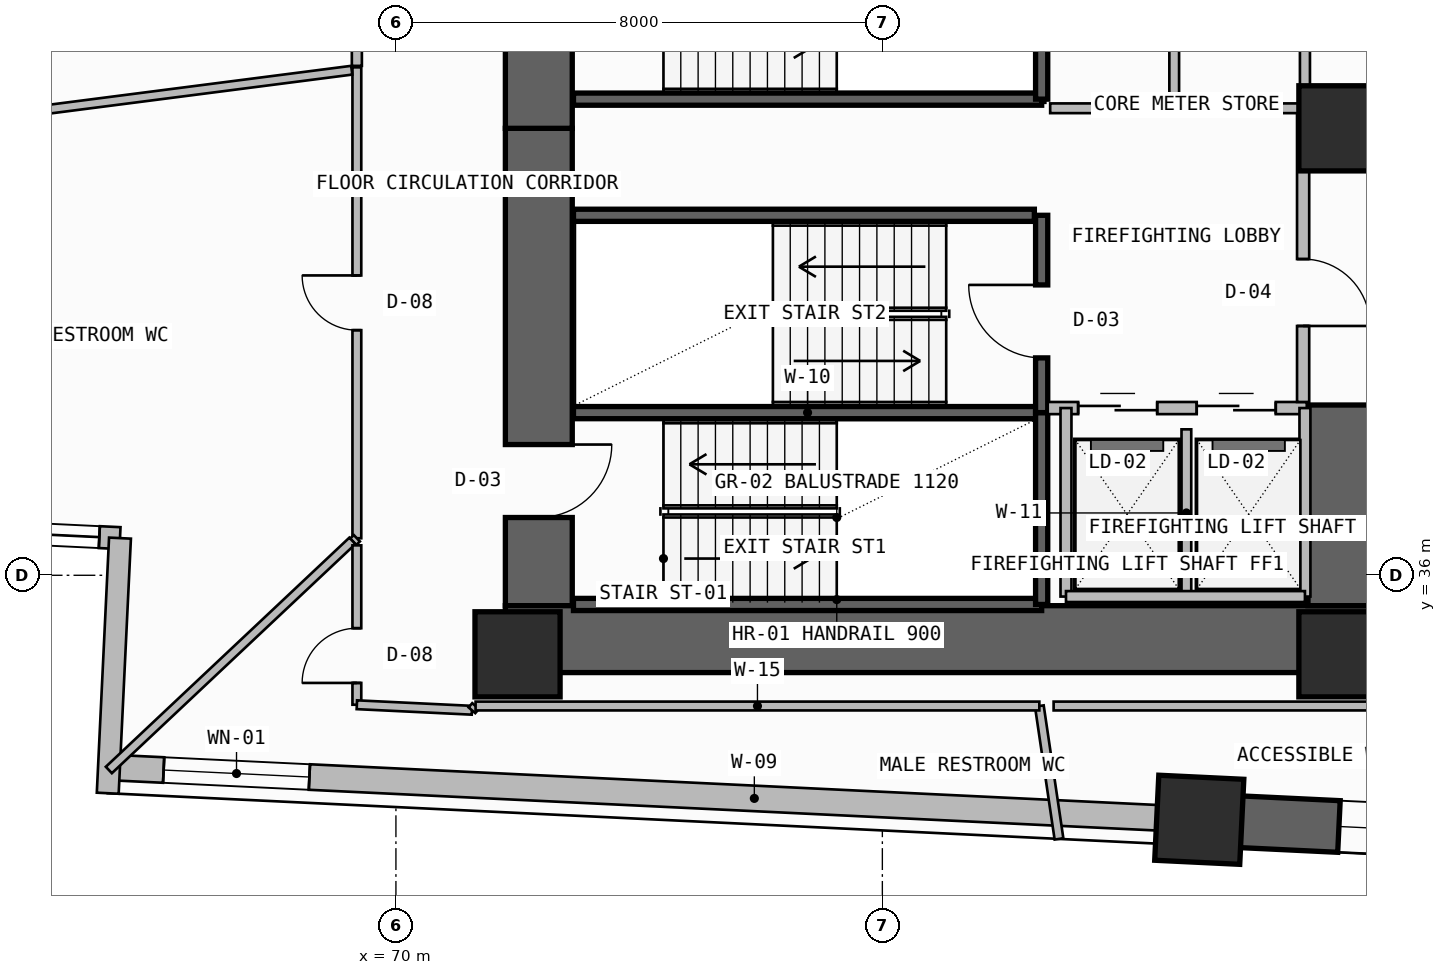
"""IFC4 building model, lengths in metres.
Left out: names, types, materials, properties, quantities, classifications, styles, units other than length and angle.
Written with IfcOpenShell. Run it as: python <this file> out.ifc"""

import sys

from ifc_helpers import new_model, si_unit, direction, frame, frame_2d, origin, origin_2d, place, context, subcontext, project, spatial, rectangle, extrude, element, fill, save


model = new_model("IFC4")
c1 = context("Model", 3, precision=1e-05, world=origin(), true_north=direction((0.0, 1.0)))
c2 = subcontext(c1, "Body", "Model", "MODEL_VIEW")
j1 = project(units=[si_unit("LENGTHUNIT", "METRE"), si_unit("PLANEANGLEUNIT", "RADIAN")], contexts=[c1])
p1 = place(None, origin())
s1 = spatial("IfcSite", under=j1, at=p1, CompositionType="ELEMENT")
p2 = place(p1, origin())
s2 = spatial("IfcBuilding", under=s1, at=p2, CompositionType="ELEMENT")
p3 = place(p2, frame((0.0, 0.0, 33.9)))
s3 = spatial("IfcBuildingStorey", under=s2, at=p3, CompositionType="ELEMENT", Elevation=33.9)
p4 = place(p3, frame((72.35, 35.5, -0.2), z_axis=(0.0, 0.0, 1.0), x_axis=(0.0, 1.0, 0.0)))
e1 = element("IfcWall", 1, at=p4, inside=s3, PredefinedType="SHEAR", context=c2, shape_type="SweptSolid", body=[
    extrude(rectangle(XDim=7.85, YDim=1.1, at=frame_2d((3.925, 0.0))), origin(), (0.0, 0.0, 1.0), 3.54),
])
p5 = place(p4, frame((1.45, 0.0, 0.2)))
e2 = element("IfcOpeningElement", 2, at=p5, cuts=e1, PredefinedType="OPENING", context=c2, shape_type="SweptSolid", body=[
    extrude(rectangle(XDim=1.2, YDim=2.2, at=frame_2d((0.6, 1.1))), frame((0.0, 0.56, 0.0), z_axis=(0.0, -1.0, 0.0), x_axis=(1.0, 0.0, 0.0)), (0.0, 0.0, 1.0), 1.12),
])
p6 = place(p3, frame((71.8, 34.95, -0.2), z_axis=(0.0, 0.0, 1.0), x_axis=(1.0, 0.0, 0.0)))
e3 = element("IfcWall", 3, at=p6, inside=s3, PredefinedType="SHEAR", context=c2, shape_type="SweptSolid", body=[
    extrude(rectangle(XDim=14.3, YDim=1.1, at=frame_2d((7.15, 0.0))), origin(), (0.0, 0.0, 1.0), 3.54),
])
p7 = place(p3, frame((85.55, 35.5, -0.2), z_axis=(0.0, 0.0, 1.0), x_axis=(0.0, 1.0, 0.0)))
e4 = element("IfcWall", 4, at=p7, inside=s3, PredefinedType="SHEAR", context=c2, shape_type="SweptSolid", body=[
    extrude(rectangle(XDim=3.3, YDim=1.1, at=frame_2d((1.65, 0.0))), origin(), (0.0, 0.0, 1.0), 3.54),
])
p8 = place(p3, frame((72.35, 43.35, -0.2), z_axis=(0.0, 0.0, 1.0), x_axis=(0.0, 1.0, 0.0)))
e5 = element("IfcWall", 5, at=p8, inside=s3, PredefinedType="SHEAR", context=c2, shape_type="SweptSolid", body=[
    extrude(rectangle(XDim=12.7, YDim=1.1, at=frame_2d((6.35, 0.0))), origin(), (0.0, 0.0, 1.0), 3.54),
])
p9 = place(p8, frame((1.35, 0.0, 0.2)))
e6 = element("IfcOpeningElement", 6, at=p9, cuts=e5, PredefinedType="OPENING", context=c2, shape_type="SweptSolid", body=[
    extrude(rectangle(XDim=1.2, YDim=2.2, at=frame_2d((0.6, 1.1))), frame((0.0, 0.56, 0.0), z_axis=(0.0, -1.0, 0.0), x_axis=(1.0, 0.0, 0.0)), (0.0, 0.0, 1.0), 1.12),
])
for number, where, z_axis, x_axis in (
    (7, (72.0, 34.7, 0.0), (0.0, 0.0, 1.0), (1.0, 0.0, 0.0)),
    (8, (85.55, 34.7, 0.0), (0.0, 0.0, 1.0), (1.0, 0.0, 0.0)),
    (9, (85.55, 43.35, 0.0), (0.0, 0.0, 1.0), (1.0, 0.0, 0.0)),
    (10, (83.212, 31.979, 0.0), (0.0, 0.0, 1.0), (-0.999, 0.048, 0.0)),
):
    element("IfcColumn", number, at=place(p3, frame(where, z_axis=z_axis, x_axis=x_axis)), inside=s3, PredefinedType="COLUMN", context=c2, shape_type="SweptSolid", body=[
        extrude(rectangle(XDim=1.4, YDim=1.4, at=origin_2d()), origin(), (0.0, 0.0, 1.0), 3.6),
    ])
p10 = place(p3, frame((65.281, 32.841, 0.0), z_axis=(0.0, 0.0, 1.0), x_axis=(0.998848298084, -0.047979968897, 0.0)))
e11 = element("IfcWall", 11, at=p10, inside=s3, PredefinedType="SOLIDWALL", context=c2, shape_type="SweptSolid", body=[
    extrude(rectangle(XDim=17.952, YDim=0.42, at=frame_2d((8.976, 0.0))), origin(), (0.0, 0.0, 1.0), 2.325),
])
p11 = place(p10, frame((0.9, 0.0, 1.2)))
e12 = element("IfcOpeningElement", 12, at=p11, cuts=e11, PredefinedType="OPENING", context=c2, shape_type="SweptSolid", body=[
    extrude(rectangle(XDim=2.4, YDim=0.9, at=frame_2d((1.2, 0.45))), frame((0.0, 0.22, 0.0), z_axis=(0.0, -1.0, 0.0), x_axis=(1.0, 0.0, 0.0)), (0.0, 0.0, 1.0), 0.44),
])
p12 = place(p3, frame((83.212, 31.979, -0.2), z_axis=(0.0, 0.0, 1.0), x_axis=(0.998848235141, -0.047981279227, 0.0)))
e13 = element("IfcWall", 13, at=p12, inside=s3, PredefinedType="SHEAR", context=c2, shape_type="SweptSolid", body=[
    extrude(rectangle(XDim=27.456, YDim=0.85, at=frame_2d((13.728, 0.0))), origin(), (0.0, 0.0, 1.0), 3.54),
])
p13 = place(p12, frame((2.3, 0.0, 1.2)))
e14 = element("IfcOpeningElement", 14, at=p13, cuts=e13, PredefinedType="OPENING", context=c2, shape_type="SweptSolid", body=[
    extrude(rectangle(XDim=2.4, YDim=0.9, at=frame_2d((1.2, 0.45))), frame((0.0, 0.435, 0.0), z_axis=(0.0, -1.0, 0.0), x_axis=(1.0, 0.0, 0.0)), (0.0, 0.0, 1.0), 0.87),
])
p14 = place(p3, frame((61.267, 36.812, 0.0), z_axis=(0.0, 0.0, 1.0), x_axis=(0.998849519138, -0.047954542207, 0.0)))
e15 = element("IfcWall", 15, at=p14, inside=s3, PredefinedType="SOLIDWALL", context=c2, shape_type="SweptSolid", body=[
    extrude(rectangle(XDim=4.2, YDim=0.36, at=frame_2d((2.1, 0.0))), origin(), (0.0, 0.0, 1.0), 3.34),
])
p15 = place(p14, frame((2.56, 0.0, 0.45)))
e16 = element("IfcOpeningElement", 16, at=p15, cuts=e15, PredefinedType="OPENING", context=c2, shape_type="SweptSolid", body=[
    extrude(rectangle(XDim=1.3, YDim=2.4, at=frame_2d((0.65, 1.2))), frame((0.0, 0.19, 0.0), z_axis=(0.0, -1.0, 0.0), x_axis=(1.0, 0.0, 0.0)), (0.0, 0.0, 1.0), 0.38),
])
p16 = place(p3, frame((65.462, 36.611, 0.0), z_axis=(0.0, 0.0, 1.0), x_axis=(-0.048015322758, -0.998846599224, 0.0)))
e17 = element("IfcWall", 17, at=p16, inside=s3, PredefinedType="SOLIDWALL", context=c2, shape_type="SweptSolid", body=[
    extrude(rectangle(XDim=4.2, YDim=0.36, at=frame_2d((2.1, 0.0))), origin(), (0.0, 0.0, 1.0), 3.34),
])
for number, where, z_axis, x_axis in (
    (18, (72.92, 35.52, -0.2), (0.0, 0.0, 1.0), (1.0, 0.0, 0.0)),
    (19, (72.92, 38.675, -0.2), (0.0, 0.0, 1.0), (1.0, 0.0, 0.0)),
):
    element("IfcWall", number, at=place(p3, frame(where, z_axis=z_axis, x_axis=x_axis)), inside=s3, PredefinedType="SOLIDWALL", context=c2, shape_type="SweptSolid", body=[
        extrude(rectangle(XDim=7.7, YDim=0.2, at=frame_2d((3.85, 0.0))), origin(), (0.0, 0.0, 1.0), 3.54),
    ])
p17 = place(p3, frame((80.62, 35.52, -0.2), z_axis=(0.0, 0.0, 1.0), x_axis=(0.0, 1.0, 0.0)))
e20 = element("IfcWall", 20, at=p17, inside=s3, PredefinedType="SOLIDWALL", context=c2, shape_type="SweptSolid", body=[
    extrude(rectangle(XDim=3.155, YDim=0.2, at=frame_2d((1.578, 0.0))), origin(), (0.0, 0.0, 1.0), 3.54),
])
p18 = place(p3, frame((80.62, 38.675, -0.2), z_axis=(0.0, 0.0, 1.0), x_axis=(0.0, 1.0, 0.0)))
e21 = element("IfcWall", 21, at=p18, inside=s3, PredefinedType="SOLIDWALL", context=c2, shape_type="SweptSolid", body=[
    extrude(rectangle(XDim=3.245, YDim=0.2, at=frame_2d((1.623, 0.0))), origin(), (0.0, 0.0, 1.0), 3.54),
])
p19 = place(p18, frame((0.9, 0.0, 0.2)))
e22 = element("IfcOpeningElement", 22, at=p19, cuts=e21, PredefinedType="OPENING", context=c2, shape_type="SweptSolid", body=[
    extrude(rectangle(XDim=1.2, YDim=2.2, at=frame_2d((0.6, 1.1))), frame((0.0, 0.11, 0.0), z_axis=(0.0, -1.0, 0.0), x_axis=(1.0, 0.0, 0.0)), (0.0, 0.0, 1.0), 0.22),
])
p20 = place(p3, frame((80.72, 38.75, 0.0), z_axis=(0.0, 0.0, 1.0), x_axis=(1.0, 0.0, 0.0)))
e23 = element("IfcWall", 23, at=p20, inside=s3, PredefinedType="SOLIDWALL", context=c2, shape_type="SweptSolid", body=[
    extrude(rectangle(XDim=4.26, YDim=0.2, at=frame_2d((2.13, 0.0))), origin(), (0.0, 0.0, 1.0), 3.34),
])
p21 = place(p20, frame((0.5, 0.0, 0.0)))
e24 = element("IfcOpeningElement", 24, at=p21, cuts=e23, PredefinedType="OPENING", context=c2, shape_type="SweptSolid", body=[
    extrude(rectangle(XDim=1.3, YDim=2.3, at=frame_2d((0.65, 1.15))), frame((0.0, 0.11, 0.0), z_axis=(0.0, -1.0, 0.0), x_axis=(1.0, 0.0, 0.0)), (0.0, 0.0, 1.0), 0.22),
])
p22 = place(p20, frame((2.45, 0.0, 0.0)))
e25 = element("IfcOpeningElement", 25, at=p22, cuts=e23, PredefinedType="OPENING", context=c2, shape_type="SweptSolid", body=[
    extrude(rectangle(XDim=1.3, YDim=2.3, at=frame_2d((0.65, 1.15))), frame((0.0, 0.11, 0.0), z_axis=(0.0, -1.0, 0.0), x_axis=(1.0, 0.0, 0.0)), (0.0, 0.0, 1.0), 0.22),
])
p23 = place(p3, frame((83.0, 35.65, 0.0), z_axis=(0.0, 0.0, 1.0), x_axis=(0.0, 1.0, 0.0)))
e26 = element("IfcWall", 26, at=p23, inside=s3, PredefinedType="PLUMBINGWALL", context=c2, shape_type="SweptSolid", body=[
    extrude(rectangle(XDim=2.75, YDim=0.16, at=frame_2d((1.375, 0.0))), origin(), (0.0, 0.0, 1.0), 3.34),
])
for number, where, z_axis, x_axis in (
    (27, (84.95, 35.65, 0.0), (0.0, 0.0, 1.0), (0.0, 1.0, 0.0)),
    (28, (81.02, 35.65, 0.0), (0.0, 0.0, 1.0), (0.0, 1.0, 0.0)),
):
    element("IfcWall", number, at=place(p3, frame(where, z_axis=z_axis, x_axis=x_axis)), inside=s3, PredefinedType="SOLIDWALL", context=c2, shape_type="SweptSolid", body=[
        extrude(rectangle(XDim=3.1, YDim=0.18, at=frame_2d((1.55, 0.0))), origin(), (0.0, 0.0, 1.0), 3.34),
    ])
p24 = place(p3, frame((81.02, 35.65, 0.0), z_axis=(0.0, 0.0, 1.0), x_axis=(1.0, 0.0, 0.0)))
e29 = element("IfcWall", 29, at=p24, inside=s3, PredefinedType="SOLIDWALL", context=c2, shape_type="SweptSolid", body=[
    extrude(rectangle(XDim=3.93, YDim=0.18, at=frame_2d((1.965, 0.0))), origin(), (0.0, 0.0, 1.0), 3.34),
])
p25 = place(p3, frame((84.92, 38.85, 0.0), z_axis=(0.0, 0.0, 1.0), x_axis=(0.0, 1.0, 0.0)))
e30 = element("IfcWall", 30, at=p25, inside=s3, PredefinedType="SOLIDWALL", context=c2, shape_type="SweptSolid", body=[
    extrude(rectangle(XDim=4.83, YDim=0.2, at=frame_2d((2.415, 0.0))), origin(), (0.0, 0.0, 1.0), 3.34),
])
p26 = place(p25, frame((1.25, 0.0, 0.0)))
e31 = element("IfcOpeningElement", 31, at=p26, cuts=e30, PredefinedType="OPENING", context=c2, shape_type="SweptSolid", body=[
    extrude(rectangle(XDim=1.1, YDim=2.2, at=frame_2d((0.55, 1.1))), frame((0.0, 0.11, 0.0), z_axis=(0.0, -1.0, 0.0), x_axis=(1.0, 0.0, 0.0)), (0.0, 0.0, 1.0), 0.22),
])
p27 = place(p3, frame((72.92, 41.92, -0.2), z_axis=(0.0, 0.0, 1.0), x_axis=(1.0, 0.0, 0.0)))
e32 = element("IfcWall", 32, at=p27, inside=s3, PredefinedType="SOLIDWALL", context=c2, shape_type="SweptSolid", body=[
    extrude(rectangle(XDim=7.58, YDim=0.2, at=frame_2d((3.79, 0.0))), origin(), (0.0, 0.0, 1.0), 3.54),
])
p28 = place(p3, frame((72.92, 43.83, -0.2), z_axis=(0.0, 0.0, 1.0), x_axis=(1.0, 0.0, 0.0)))
e33 = element("IfcWall", 33, at=p28, inside=s3, PredefinedType="SOLIDWALL", context=c2, shape_type="SweptSolid", body=[
    extrude(rectangle(XDim=7.7, YDim=0.2, at=frame_2d((3.85, 0.0))), origin(), (0.0, 0.0, 1.0), 3.54),
])
p29 = place(p3, frame((80.62, 43.83, -0.2), z_axis=(0.0, 0.0, 1.0), x_axis=(0.0, 1.0, 0.0)))
e34 = element("IfcWall", 34, at=p29, inside=s3, PredefinedType="SOLIDWALL", context=c2, shape_type="SweptSolid", body=[
    extrude(rectangle(XDim=3.24, YDim=0.2, at=frame_2d((1.62, 0.0))), origin(), (0.0, 0.0, 1.0), 3.54),
])
p30 = place(p3, frame((84.95, 43.68, 0.0), z_axis=(0.0, 0.0, 1.0), x_axis=(0.0, 1.0, 0.0)))
e35 = element("IfcWall", 35, at=p30, inside=s3, PredefinedType="PLUMBINGWALL", context=c2, shape_type="SweptSolid", body=[
    extrude(rectangle(XDim=1.9, YDim=0.165, at=frame_2d((0.95, 0.0))), origin(), (0.0, 0.0, 1.0), 3.34),
])
p31 = place(p3, frame((80.76, 43.68, 0.0), z_axis=(0.0, 0.0, 1.0), x_axis=(1.0, 0.0, 0.0)))
e36 = element("IfcWall", 36, at=p31, inside=s3, PredefinedType="PLUMBINGWALL", context=c2, shape_type="SweptSolid", body=[
    extrude(rectangle(XDim=4.19, YDim=0.16, at=frame_2d((2.095, 0.0))), origin(), (0.0, 0.0, 1.0), 3.34),
])
p32 = place(p3, frame((82.8, 43.68, 0.0), z_axis=(0.0, 0.0, 1.0), x_axis=(0.0, 1.0, 0.0)))
e37 = element("IfcWall", 37, at=p32, inside=s3, PredefinedType="PLUMBINGWALL", context=c2, shape_type="SweptSolid", body=[
    extrude(rectangle(XDim=1.9, YDim=0.16, at=frame_2d((0.95, 0.0))), origin(), (0.0, 0.0, 1.0), 3.34),
])
p33 = place(p3, frame((69.357, 44.353, 0.0), z_axis=(0.0, 0.0, 1.0), x_axis=(0.0, -1.0, 0.0)))
e38 = element("IfcWall", 38, at=p33, inside=s3, PredefinedType="PARTITIONING", context=c2, shape_type="SweptSolid", body=[
    extrude(rectangle(XDim=7.744, YDim=0.145, at=frame_2d((3.872, 0.0))), origin(), (0.0, 0.0, 1.0), 3.34),
])
p34 = place(p33, frame((3.422, 0.0, 0.0)))
e39 = element("IfcOpeningElement", 39, at=p34, cuts=e38, PredefinedType="OPENING", context=c2, shape_type="SweptSolid", body=[
    extrude(rectangle(XDim=0.9, YDim=2.1, at=frame_2d((0.45, 1.05))), frame((0.0, 0.083, 0.0), z_axis=(0.0, -1.0, 0.0), x_axis=(1.0, 0.0, 0.0)), (0.0, 0.0, 1.0), 0.165),
])
p35 = place(p3, frame((69.357, 36.609, 0.0), z_axis=(0.0, 0.0, 1.0), x_axis=(-0.723154482123, -0.690686321701, 0.0)))
e40 = element("IfcWall", 40, at=p35, inside=s3, PredefinedType="PARTITIONING", context=c2, shape_type="SweptSolid", body=[
    extrude(rectangle(XDim=0.083, YDim=0.145, at=frame_2d((0.042, 0.0))), origin(), (0.0, 0.0, 1.0), 3.34),
])
p36 = place(p3, frame((69.284, 36.566, 0.0), z_axis=(0.0, 0.0, 1.0), x_axis=(-0.728310768674, -0.685246980463, 0.0)))
e41 = element("IfcWall", 41, at=p36, inside=s3, PredefinedType="PARTITIONING", context=c2, shape_type="SweptSolid", body=[
    extrude(rectangle(XDim=5.499, YDim=0.145, at=frame_2d((2.75, 0.0))), origin(), (0.0, 0.0, 1.0), 3.34),
])
p37 = place(p3, frame((61.579, 43.315, 0.0), z_axis=(0.0, 0.0, 1.0), x_axis=(0.991807089994, 0.127744652481, 0.0)))
e42 = element("IfcWall", 42, at=p37, inside=s3, PredefinedType="PARTITIONING", context=c2, shape_type="SweptSolid", body=[
    extrude(rectangle(XDim=7.757, YDim=0.145, at=frame_2d((3.879, 0.0))), origin(), (0.0, 0.0, 1.0), 3.34),
])
p38 = place(p3, frame((69.357, 36.492, 0.0), z_axis=(0.0, 0.0, 1.0), x_axis=(0.0, -1.0, 0.0)))
e43 = element("IfcWall", 43, at=p38, inside=s3, PredefinedType="PARTITIONING", context=c2, shape_type="SweptSolid", body=[
    extrude(rectangle(XDim=2.621, YDim=0.145, at=frame_2d((1.311, 0.0))), origin(), (0.0, 0.0, 1.0), 3.34),
])
p39 = place(p38, frame((1.363, 0.0, 0.0)))
e44 = element("IfcOpeningElement", 44, at=p39, cuts=e43, PredefinedType="OPENING", context=c2, shape_type="SweptSolid", body=[
    extrude(rectangle(XDim=0.9, YDim=2.1, at=frame_2d((0.45, 1.05))), frame((0.0, 0.083, 0.0), z_axis=(0.0, -1.0, 0.0), x_axis=(1.0, 0.0, 0.0)), (0.0, 0.0, 1.0), 0.165),
])
p40 = place(p3, frame((69.357, 33.871, 0.0), z_axis=(0.0, 0.0, 1.0), x_axis=(0.998850579145, -0.047932458132, 0.0)))
e45 = element("IfcWall", 45, at=p40, inside=s3, PredefinedType="PARTITIONING", context=c2, shape_type="SweptSolid", body=[
    extrude(rectangle(XDim=1.895, YDim=0.145, at=frame_2d((0.947, 0.0))), origin(), (0.0, 0.0, 1.0), 3.34),
])
p41 = place(p3, frame((71.25, 33.78, 0.0), z_axis=(0.0, 0.0, 1.0), x_axis=(0.652100218984, 0.758132774916, 0.0)))
e46 = element("IfcWall", 46, at=p41, inside=s3, PredefinedType="PARTITIONING", context=c2, shape_type="SweptSolid", body=[
    extrude(rectangle(XDim=0.092, YDim=0.145, at=frame_2d((0.046, 0.0))), origin(), (0.0, 0.0, 1.0), 3.34),
])
p42 = place(p3, frame((80.582, 33.85, 0.0), z_axis=(0.0, 0.0, 1.0), x_axis=(0.146308364434, -0.989239032033, 0.0)))
e47 = element("IfcWall", 47, at=p42, inside=s3, PredefinedType="PARTITIONING", context=c2, shape_type="SweptSolid", body=[
    extrude(rectangle(XDim=2.209, YDim=0.145, at=frame_2d((1.104, 0.0))), origin(), (0.0, 0.0, 1.0), 3.34),
])
p43 = place(p3, frame((69.357, 50.767, 0.0), z_axis=(0.0, 0.0, 1.0), x_axis=(0.0, -1.0, 0.0)))
e48 = element("IfcWall", 48, at=p43, inside=s3, PredefinedType="PARTITIONING", context=c2, shape_type="SweptSolid", body=[
    extrude(rectangle(XDim=6.389, YDim=0.165, at=frame_2d((3.195, 0.0))), origin(), (0.0, 0.0, 1.0), 3.34),
])
p44 = place(p43, frame((2.695, 0.0, 0.0)))
e49 = element("IfcOpeningElement", 49, at=p44, cuts=e48, PredefinedType="OPENING", context=c2, shape_type="SweptSolid", body=[
    extrude(rectangle(XDim=1.0, YDim=2.2, at=frame_2d((0.5, 1.1))), frame((0.0, 0.093, 0.0), z_axis=(0.0, -1.0, 0.0), x_axis=(1.0, 0.0, 0.0)), (0.0, 0.0, 1.0), 0.185),
])
p45 = place(p3, frame((71.31, 33.85, 0.0), z_axis=(0.0, 0.0, 1.0), x_axis=(1.0, 0.0, 0.0)))
e50 = element("IfcWall", 50, at=p45, inside=s3, PredefinedType="PARTITIONING", context=c2, shape_type="SweptSolid", body=[
    extrude(rectangle(XDim=9.272, YDim=0.145, at=frame_2d((4.636, 0.0))), origin(), (0.0, 0.0, 1.0), 3.34),
])
p46 = place(p3, frame((80.817, 33.85, 0.0), z_axis=(0.0, 0.0, 1.0), x_axis=(1.0, 0.0, 0.0)))
e51 = element("IfcWall", 51, at=p46, inside=s3, PredefinedType="PARTITIONING", context=c2, shape_type="SweptSolid", body=[
    extrude(rectangle(XDim=5.251, YDim=0.145, at=frame_2d((2.625, 0.0))), origin(), (0.0, 0.0, 1.0), 2.725),
])
p47 = place(p11, origin())
e52 = element("IfcWindow", 52, at=p47, inside=s3, PartitioningType="SINGLE_PANEL", PredefinedType="WINDOW", context=c2, shape_type="SweptSolid", body=[
    extrude(rectangle(XDim=2.4, YDim=0.9, at=frame_2d((1.2, 0.45))), frame((0.0, 0.03, 0.0), z_axis=(0.0, -1.0, 0.0), x_axis=(1.0, 0.0, 0.0)), (0.0, 0.0, 1.0), 0.06),
])
fill(e12, e52)
p48 = place(p13, origin())
e53 = element("IfcWindow", 53, at=p48, inside=s3, PartitioningType="SINGLE_PANEL", PredefinedType="WINDOW", context=c2, shape_type="SweptSolid", body=[
    extrude(rectangle(XDim=2.4, YDim=0.9, at=frame_2d((1.2, 0.45))), frame((0.0, 0.03, 0.0), z_axis=(0.0, -1.0, 0.0), x_axis=(1.0, 0.0, 0.0)), (0.0, 0.0, 1.0), 0.06),
])
fill(e14, e53)
p49 = place(p15, origin())
e54 = element("IfcWindow", 54, at=p49, inside=s3, PartitioningType="SINGLE_PANEL", PredefinedType="WINDOW", context=c2, shape_type="SweptSolid", body=[
    extrude(rectangle(XDim=1.3, YDim=2.4, at=frame_2d((0.65, 1.2))), frame((0.0, 0.03, 0.0), z_axis=(0.0, -1.0, 0.0), x_axis=(1.0, 0.0, 0.0)), (0.0, 0.0, 1.0), 0.06),
])
fill(e16, e54)
p50 = place(p5, frame((1.2, 0.0, 0.0), z_axis=(0.0, 0.0, 1.0), x_axis=(-1.0, 0.0, 0.0)))
e55 = element("IfcDoor", 55, at=p50, inside=s3, OperationType="SINGLE_SWING_LEFT", PredefinedType="USERDEFINED", context=c2, shape_type="SweptSolid", body=[
    extrude(rectangle(XDim=1.2, YDim=2.2, at=frame_2d((0.6, 1.1))), frame((0.0, 0.025, 0.0), z_axis=(0.0, -1.0, 0.0), x_axis=(1.0, 0.0, 0.0)), (0.0, 0.0, 1.0), 0.05),
])
fill(e2, e55)
p51 = place(p19, origin())
e56 = element("IfcDoor", 56, at=p51, inside=s3, OperationType="SINGLE_SWING_RIGHT", PredefinedType="USERDEFINED", context=c2, shape_type="SweptSolid", body=[
    extrude(rectangle(XDim=1.2, YDim=2.2, at=frame_2d((0.6, 1.1))), frame((0.0, 0.025, 0.0), z_axis=(0.0, -1.0, 0.0), x_axis=(1.0, 0.0, 0.0)), (0.0, 0.0, 1.0), 0.05),
])
fill(e22, e56)
p52 = place(p21, origin())
e57 = element("IfcDoor", 57, at=p52, inside=s3, OperationType="DOUBLE_DOOR_SLIDING", PredefinedType="DOOR", context=c2, shape_type="SweptSolid", body=[
    extrude(rectangle(XDim=1.3, YDim=2.3, at=frame_2d((0.65, 1.15))), frame((0.0, 0.025, 0.0), z_axis=(0.0, -1.0, 0.0), x_axis=(1.0, 0.0, 0.0)), (0.0, 0.0, 1.0), 0.05),
])
fill(e24, e57)
p53 = place(p22, origin())
e58 = element("IfcDoor", 58, at=p53, inside=s3, OperationType="DOUBLE_DOOR_SLIDING", PredefinedType="DOOR", context=c2, shape_type="SweptSolid", body=[
    extrude(rectangle(XDim=1.3, YDim=2.3, at=frame_2d((0.65, 1.15))), frame((0.0, 0.025, 0.0), z_axis=(0.0, -1.0, 0.0), x_axis=(1.0, 0.0, 0.0)), (0.0, 0.0, 1.0), 0.05),
])
fill(e25, e58)
p54 = place(p26, frame((1.1, 0.0, 0.0), z_axis=(0.0, 0.0, 1.0), x_axis=(-1.0, 0.0, 0.0)))
e59 = element("IfcDoor", 59, at=p54, inside=s3, OperationType="SINGLE_SWING_RIGHT", PredefinedType="DOOR", context=c2, shape_type="SweptSolid", body=[
    extrude(rectangle(XDim=1.1, YDim=2.2, at=frame_2d((0.55, 1.1))), frame((0.0, 0.025, 0.0), z_axis=(0.0, -1.0, 0.0), x_axis=(1.0, 0.0, 0.0)), (0.0, 0.0, 1.0), 0.05),
])
fill(e31, e59)
p55 = place(p34, frame((0.9, 0.0, 0.0), z_axis=(0.0, 0.0, 1.0), x_axis=(-1.0, 0.0, 0.0)))
e60 = element("IfcDoor", 60, at=p55, inside=s3, OperationType="SINGLE_SWING_RIGHT", PredefinedType="DOOR", context=c2, shape_type="SweptSolid", body=[
    extrude(rectangle(XDim=0.9, YDim=2.1, at=frame_2d((0.45, 1.05))), frame((0.0, 0.025, 0.0), z_axis=(0.0, -1.0, 0.0), x_axis=(1.0, 0.0, 0.0)), (0.0, 0.0, 1.0), 0.05),
])
fill(e39, e60)
p56 = place(p39, frame((0.9, 0.0, 0.0), z_axis=(0.0, 0.0, 1.0), x_axis=(-1.0, 0.0, 0.0)))
e61 = element("IfcDoor", 61, at=p56, inside=s3, OperationType="SINGLE_SWING_LEFT", PredefinedType="DOOR", context=c2, shape_type="SweptSolid", body=[
    extrude(rectangle(XDim=0.9, YDim=2.1, at=frame_2d((0.45, 1.05))), frame((0.0, 0.025, 0.0), z_axis=(0.0, -1.0, 0.0), x_axis=(1.0, 0.0, 0.0)), (0.0, 0.0, 1.0), 0.05),
])
fill(e44, e61)
save(model, sys.argv[1])
